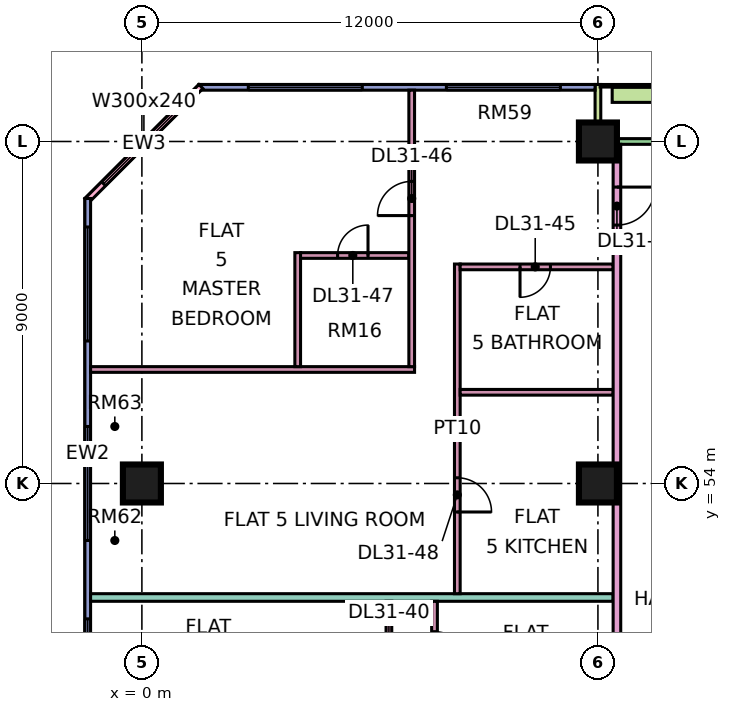
"""IFC4 building model, lengths in metres.
Left out: names, types, materials, properties, quantities, classifications, styles, units other than length and angle.
Written with IfcOpenShell. Run it as: python <this file> out.ifc"""

import sys

from ifc_helpers import new_model, si_unit, direction, frame, frame_2d, origin, origin_2d, place, context, subcontext, project, spatial, rectangle, extrude, element, fill, save


model = new_model("IFC4")
c1 = context("Model", 3, precision=1e-05, world=origin(), true_north=direction((0.0, 1.0)))
c2 = subcontext(c1, "Body", "Model", "MODEL_VIEW")
j1 = project(units=[si_unit("LENGTHUNIT", "METRE"), si_unit("PLANEANGLEUNIT", "RADIAN")], contexts=[c1])
p1 = place(None, origin())
s1 = spatial("IfcSite", under=j1, at=p1, CompositionType="ELEMENT")
p2 = place(p1, origin())
s2 = spatial("IfcBuilding", under=s1, at=p2, CompositionType="ELEMENT")
p3 = place(p2, frame((0.0, 0.0, 133.15)))
s3 = spatial("IfcBuildingStorey", under=s2, at=p3, CompositionType="ELEMENT", Elevation=133.15)
for number, where, z_axis, x_axis in (
    (1, (0.0, 54.0, 0.0), (0.0, 0.0, 1.0), (1.0, 0.0, 0.0)),
    (2, (12.0, 54.0, 0.0), (0.0, 0.0, 1.0), (1.0, 0.0, 0.0)),
    (3, (12.0, 63.0, 0.0), (0.0, 0.0, 1.0), (1.0, 0.0, 0.0)),
):
    element("IfcColumn", number, at=place(p3, frame(where, z_axis=z_axis, x_axis=x_axis)), inside=s3, PredefinedType="COLUMN", context=c2, shape_type="SweptSolid", body=[
        extrude(rectangle(XDim=1.0, YDim=1.0, at=origin_2d()), origin(), (0.0, 0.0, 1.0), 3.75),
    ])
p4 = place(p3, frame((22.425, 63.0, 0.0), z_axis=(0.0, 0.0, 1.0), x_axis=(-1.0, 0.0, 0.0)))
e4 = element("IfcWall", 4, at=p4, inside=s3, PredefinedType="SOLIDWALL", context=c2, shape_type="SweptSolid", body=[
    extrude(rectangle(XDim=10.35, YDim=0.15, at=frame_2d((5.175, 0.0))), origin(), (0.0, 0.0, 1.0), 3.35),
])
p5 = place(p4, frame((0.562, 0.0, 0.45)))
e5 = element("IfcOpeningElement", 5, at=p5, cuts=e4, PredefinedType="OPENING", context=c2, shape_type="SweptSolid", body=[
    extrude(rectangle(XDim=1.8, YDim=2.4, at=frame_2d((0.9, 1.2))), frame((0.0, 0.085, 0.0), z_axis=(0.0, -1.0, 0.0), x_axis=(1.0, 0.0, 0.0)), (0.0, 0.0, 1.0), 0.17),
])
p6 = place(p4, frame((4.575, 0.0, 0.45)))
e6 = element("IfcOpeningElement", 6, at=p6, cuts=e4, PredefinedType="OPENING", context=c2, shape_type="SweptSolid", body=[
    extrude(rectangle(XDim=1.8, YDim=2.4, at=frame_2d((0.9, 1.2))), frame((0.0, 0.085, 0.0), z_axis=(0.0, -1.0, 0.0), x_axis=(1.0, 0.0, 0.0)), (0.0, 0.0, 1.0), 0.17),
])
p7 = place(p3, frame((12.0, 64.5, 0.0), z_axis=(0.0, 0.0, 1.0), x_axis=(0.0, -1.0, 0.0)))
e7 = element("IfcWall", 7, at=p7, inside=s3, PredefinedType="SOLIDWALL", context=c2, shape_type="SweptSolid", body=[
    extrude(rectangle(XDim=1.5, YDim=0.15, at=frame_2d((0.75, 0.0))), origin(), (0.0, 0.0, 1.0), 3.35),
])
p8 = place(p3, frame((11.925, 64.425, 0.0), z_axis=(0.0, 0.0, 1.0), x_axis=(-1.0, 0.0, 0.0)))
e8 = element("IfcWall", 8, at=p8, inside=s3, PredefinedType="SOLIDWALL", context=c2, shape_type="SweptSolid", body=[
    extrude(rectangle(XDim=10.425, YDim=0.15, at=frame_2d((5.212, 0.0))), origin(), (0.0, 0.0, 1.0), 3.35),
])
p9 = place(p8, frame((0.913, 0.0, 0.45)))
e9 = element("IfcOpeningElement", 9, at=p9, cuts=e8, PredefinedType="OPENING", context=c2, shape_type="SweptSolid", body=[
    extrude(rectangle(XDim=3.0, YDim=2.4, at=frame_2d((1.5, 1.2))), frame((0.0, 0.085, 0.0), z_axis=(0.0, -1.0, 0.0), x_axis=(1.0, 0.0, 0.0)), (0.0, 0.0, 1.0), 0.17),
])
p10 = place(p8, frame((6.125, 0.0, 0.45)))
e10 = element("IfcOpeningElement", 10, at=p10, cuts=e8, PredefinedType="OPENING", context=c2, shape_type="SweptSolid", body=[
    extrude(rectangle(XDim=3.0, YDim=2.4, at=frame_2d((1.5, 1.2))), frame((0.0, 0.085, 0.0), z_axis=(0.0, -1.0, 0.0), x_axis=(1.0, 0.0, 0.0)), (0.0, 0.0, 1.0), 0.17),
])
p11 = place(p3, frame((1.553, 64.447, 0.0), z_axis=(0.0, 0.0, 1.0), x_axis=(-0.707106781187, -0.707106781187, 0.0)))
e11 = element("IfcWall", 11, at=p11, inside=s3, PredefinedType="SOLIDWALL", context=c2, shape_type="SweptSolid", body=[
    extrude(rectangle(XDim=4.243, YDim=0.15, at=frame_2d((2.121, 0.0))), origin(), (0.0, 0.0, 1.0), 3.35),
])
p12 = place(p11, frame((0.621, 0.0, 0.45)))
e12 = element("IfcOpeningElement", 12, at=p12, cuts=e11, PredefinedType="OPENING", context=c2, shape_type="SweptSolid", body=[
    extrude(rectangle(XDim=3.0, YDim=2.4, at=frame_2d((1.5, 1.2))), frame((0.0, 0.085, 0.0), z_axis=(0.0, -1.0, 0.0), x_axis=(1.0, 0.0, 0.0)), (0.0, 0.0, 1.0), 0.17),
])
p13 = place(p3, frame((-1.425, 61.5, 0.0), z_axis=(0.0, 0.0, 1.0), x_axis=(0.0, -1.0, 0.0)))
e13 = element("IfcWall", 13, at=p13, inside=s3, PredefinedType="SOLIDWALL", context=c2, shape_type="SweptSolid", body=[
    extrude(rectangle(XDim=13.425, YDim=0.15, at=frame_2d((6.712, 0.0))), origin(), (0.0, 0.0, 1.0), 3.35),
])
p14 = place(p13, frame((0.75, 0.0, 0.45)))
e14 = element("IfcOpeningElement", 14, at=p14, cuts=e13, PredefinedType="OPENING", context=c2, shape_type="SweptSolid", body=[
    extrude(rectangle(XDim=3.0, YDim=2.4, at=frame_2d((1.5, 1.2))), frame((0.0, 0.085, 0.0), z_axis=(0.0, -1.0, 0.0), x_axis=(1.0, 0.0, 0.0)), (0.0, 0.0, 1.0), 0.17),
])
p15 = place(p13, frame((6.0, 0.0, 0.45)))
e15 = element("IfcOpeningElement", 15, at=p15, cuts=e13, PredefinedType="OPENING", context=c2, shape_type="SweptSolid", body=[
    extrude(rectangle(XDim=3.0, YDim=2.4, at=frame_2d((1.5, 1.2))), frame((0.0, 0.085, 0.0), z_axis=(0.0, -1.0, 0.0), x_axis=(1.0, 0.0, 0.0)), (0.0, 0.0, 1.0), 0.17),
])
p16 = place(p13, frame((11.062, 0.0, 0.45)))
e16 = element("IfcOpeningElement", 16, at=p16, cuts=e13, PredefinedType="OPENING", context=c2, shape_type="SweptSolid", body=[
    extrude(rectangle(XDim=1.8, YDim=2.4, at=frame_2d((0.9, 1.2))), frame((0.0, 0.085, 0.0), z_axis=(0.0, -1.0, 0.0), x_axis=(1.0, 0.0, 0.0)), (0.0, 0.0, 1.0), 0.17),
])
p17 = place(p3, frame((22.125, 64.229, 0.0), z_axis=(0.0, 0.0, 1.0), x_axis=(-1.0, 0.0, 0.0)))
e17 = element("IfcWall", 17, at=p17, inside=s3, PredefinedType="SOLIDWALL", context=c2, shape_type="SweptSolid", body=[
    extrude(rectangle(XDim=9.75, YDim=0.4, at=frame_2d((4.875, 0.0))), origin(), (0.0, 0.0, 1.0), 0.7),
])
p18 = place(p3, frame((-1.35, 51.0, 0.0), z_axis=(0.0, 0.0, 1.0), x_axis=(1.0, 0.0, 0.0)))
e18 = element("IfcWall", 18, at=p18, inside=s3, PredefinedType="PARTITIONING", context=c2, shape_type="SweptSolid", body=[
    extrude(rectangle(XDim=13.75, YDim=0.2, at=frame_2d((6.875, 0.0))), origin(), (0.0, 0.0, 1.0), 3.35),
])
p19 = place(p3, frame((-1.35, 57.0, 0.0), z_axis=(0.0, 0.0, 1.0), x_axis=(1.0, 0.0, 0.0)))
e19 = element("IfcWall", 19, at=p19, inside=s3, PredefinedType="PARTITIONING", context=c2, shape_type="SweptSolid", body=[
    extrude(rectangle(XDim=8.525, YDim=0.15, at=frame_2d((4.263, 0.0))), origin(), (0.0, 0.0, 1.0), 3.35),
])
p20 = place(p3, frame((4.1, 57.075, 0.0), z_axis=(0.0, 0.0, 1.0), x_axis=(0.0, 1.0, 0.0)))
e20 = element("IfcWall", 20, at=p20, inside=s3, PredefinedType="PARTITIONING", context=c2, shape_type="SweptSolid", body=[
    extrude(rectangle(XDim=3.0, YDim=0.15, at=frame_2d((1.5, 0.0))), origin(), (0.0, 0.0, 1.0), 3.35),
])
p21 = place(p3, frame((4.175, 60.0, 0.0), z_axis=(0.0, 0.0, 1.0), x_axis=(1.0, 0.0, 0.0)))
e21 = element("IfcWall", 21, at=p21, inside=s3, PredefinedType="PARTITIONING", context=c2, shape_type="SweptSolid", body=[
    extrude(rectangle(XDim=2.85, YDim=0.15, at=frame_2d((1.425, 0.0))), origin(), (0.0, 0.0, 1.0), 3.35),
])
p22 = place(p21, frame((0.975, 0.0, 0.0)))
e22 = element("IfcOpeningElement", 22, at=p22, cuts=e21, PredefinedType="OPENING", context=c2, shape_type="SweptSolid", body=[
    extrude(rectangle(XDim=0.8, YDim=2.1, at=frame_2d((0.4, 1.05))), frame((0.0, 0.085, 0.0), z_axis=(0.0, -1.0, 0.0), x_axis=(1.0, 0.0, 0.0)), (0.0, 0.0, 1.0), 0.17),
])
p23 = place(p3, frame((6.5, 41.95, 0.0), z_axis=(0.0, 0.0, 1.0), x_axis=(0.0, 1.0, 0.0)))
e23 = element("IfcWall", 23, at=p23, inside=s3, PredefinedType="PARTITIONING", context=c2, shape_type="SweptSolid", body=[
    extrude(rectangle(XDim=8.95, YDim=0.15, at=frame_2d((4.475, 0.0))), origin(), (0.0, 0.0, 1.0), 3.35),
])
p24 = place(p23, frame((1.1, 0.0, 0.0)))
e24 = element("IfcOpeningElement", 24, at=p24, cuts=e23, PredefinedType="OPENING", context=c2, shape_type="SweptSolid", body=[
    extrude(rectangle(XDim=0.9, YDim=2.1, at=frame_2d((0.45, 1.05))), frame((0.0, 0.085, 0.0), z_axis=(0.0, -1.0, 0.0), x_axis=(1.0, 0.0, 0.0)), (0.0, 0.0, 1.0), 0.17),
])
p25 = place(p23, frame((7.1, 0.0, 0.0)))
e25 = element("IfcOpeningElement", 25, at=p25, cuts=e23, PredefinedType="OPENING", context=c2, shape_type="SweptSolid", body=[
    extrude(rectangle(XDim=0.9, YDim=2.1, at=frame_2d((0.45, 1.05))), frame((0.0, 0.085, 0.0), z_axis=(0.0, -1.0, 0.0), x_axis=(1.0, 0.0, 0.0)), (0.0, 0.0, 1.0), 0.17),
])
p26 = place(p3, frame((7.1, 57.075, 0.0), z_axis=(0.0, 0.0, 1.0), x_axis=(0.0, 1.0, 0.0)))
e26 = element("IfcWall", 26, at=p26, inside=s3, PredefinedType="PARTITIONING", context=c2, shape_type="SweptSolid", body=[
    extrude(rectangle(XDim=7.275, YDim=0.15, at=frame_2d((3.638, 0.0))), origin(), (0.0, 0.0, 1.0), 3.35),
])
p27 = place(p26, frame((3.975, 0.0, 0.0)))
e27 = element("IfcOpeningElement", 27, at=p27, cuts=e26, PredefinedType="OPENING", context=c2, shape_type="SweptSolid", body=[
    extrude(rectangle(XDim=0.9, YDim=2.1, at=frame_2d((0.45, 1.05))), frame((0.0, 0.085, 0.0), z_axis=(0.0, -1.0, 0.0), x_axis=(1.0, 0.0, 0.0)), (0.0, 0.0, 1.0), 0.17),
])
p28 = place(p3, frame((7.7, 39.525, 0.0), z_axis=(0.0, 0.0, 1.0), x_axis=(0.0, 1.0, 0.0)))
e28 = element("IfcWall", 28, at=p28, inside=s3, PredefinedType="PARTITIONING", context=c2, shape_type="SweptSolid", body=[
    extrude(rectangle(XDim=11.375, YDim=0.15, at=frame_2d((5.688, 0.0))), origin(), (0.0, 0.0, 1.0), 3.35),
])
p29 = place(p28, frame((0.825, 0.0, 0.0)))
e29 = element("IfcOpeningElement", 29, at=p29, cuts=e28, PredefinedType="OPENING", context=c2, shape_type="SweptSolid", body=[
    extrude(rectangle(XDim=0.8, YDim=2.1, at=frame_2d((0.4, 1.05))), frame((0.0, 0.085, 0.0), z_axis=(0.0, -1.0, 0.0), x_axis=(1.0, 0.0, 0.0)), (0.0, 0.0, 1.0), 0.17),
])
p30 = place(p28, frame((5.175, 0.0, 0.0)))
e30 = element("IfcOpeningElement", 30, at=p30, cuts=e28, PredefinedType="OPENING", context=c2, shape_type="SweptSolid", body=[
    extrude(rectangle(XDim=0.9, YDim=2.1, at=frame_2d((0.45, 1.05))), frame((0.0, 0.085, 0.0), z_axis=(0.0, -1.0, 0.0), x_axis=(1.0, 0.0, 0.0)), (0.0, 0.0, 1.0), 0.17),
])
p31 = place(p28, frame((9.675, 0.0, 0.0)))
e31 = element("IfcOpeningElement", 31, at=p31, cuts=e28, PredefinedType="OPENING", context=c2, shape_type="SweptSolid", body=[
    extrude(rectangle(XDim=0.9, YDim=2.1, at=frame_2d((0.45, 1.05))), frame((0.0, 0.085, 0.0), z_axis=(0.0, -1.0, 0.0), x_axis=(1.0, 0.0, 0.0)), (0.0, 0.0, 1.0), 0.17),
])
p32 = place(p3, frame((8.3, 51.1, 0.0), z_axis=(0.0, 0.0, 1.0), x_axis=(0.0, 1.0, 0.0)))
e32 = element("IfcWall", 32, at=p32, inside=s3, PredefinedType="PARTITIONING", context=c2, shape_type="SweptSolid", body=[
    extrude(rectangle(XDim=8.675, YDim=0.15, at=frame_2d((4.337, 0.0))), origin(), (0.0, 0.0, 1.0), 3.35),
])
p33 = place(p32, frame((2.15, 0.0, 0.0)))
e33 = element("IfcOpeningElement", 33, at=p33, cuts=e32, PredefinedType="OPENING", context=c2, shape_type="SweptSolid", body=[
    extrude(rectangle(XDim=0.9, YDim=2.1, at=frame_2d((0.45, 1.05))), frame((0.0, 0.085, 0.0), z_axis=(0.0, -1.0, 0.0), x_axis=(1.0, 0.0, 0.0)), (0.0, 0.0, 1.0), 0.17),
])
p34 = place(p3, frame((8.375, 56.4, 0.0), z_axis=(0.0, 0.0, 1.0), x_axis=(1.0, 0.0, 0.0)))
e34 = element("IfcWall", 34, at=p34, inside=s3, PredefinedType="PARTITIONING", context=c2, shape_type="SweptSolid", body=[
    extrude(rectangle(XDim=4.025, YDim=0.15, at=frame_2d((2.012, 0.0))), origin(), (0.0, 0.0, 1.0), 3.35),
])
p35 = place(p3, frame((8.375, 59.7, 0.0), z_axis=(0.0, 0.0, 1.0), x_axis=(1.0, 0.0, 0.0)))
e35 = element("IfcWall", 35, at=p35, inside=s3, PredefinedType="PARTITIONING", context=c2, shape_type="SweptSolid", body=[
    extrude(rectangle(XDim=4.025, YDim=0.15, at=frame_2d((2.012, 0.0))), origin(), (0.0, 0.0, 1.0), 3.35),
])
p36 = place(p35, frame((1.575, 0.0, 0.0)))
e36 = element("IfcOpeningElement", 36, at=p36, cuts=e35, PredefinedType="OPENING", context=c2, shape_type="SweptSolid", body=[
    extrude(rectangle(XDim=0.8, YDim=2.1, at=frame_2d((0.4, 1.05))), frame((0.0, 0.085, 0.0), z_axis=(0.0, -1.0, 0.0), x_axis=(1.0, 0.0, 0.0)), (0.0, 0.0, 1.0), 0.17),
])
p37 = place(p3, frame((12.5, 20.0, 0.0), z_axis=(0.0, 0.0, 1.0), x_axis=(0.0, 1.0, 0.0)))
e37 = element("IfcWall", 37, at=p37, inside=s3, PredefinedType="PARTITIONING", context=c2, shape_type="SweptSolid", body=[
    extrude(rectangle(XDim=42.926, YDim=0.2, at=frame_2d((21.463, 0.0))), origin(), (0.0, 0.0, 1.0), 3.35),
])
p38 = place(p37, frame((17.25, 0.0, 0.0)))
e38 = element("IfcOpeningElement", 38, at=p38, cuts=e37, PredefinedType="OPENING", context=c2, shape_type="SweptSolid", body=[
    extrude(rectangle(XDim=1.0, YDim=2.1, at=frame_2d((0.5, 1.05))), frame((0.0, 0.11, 0.0), z_axis=(0.0, -1.0, 0.0), x_axis=(1.0, 0.0, 0.0)), (0.0, 0.0, 1.0), 0.22),
])
p39 = place(p37, frame((40.8, 0.0, 0.0)))
e39 = element("IfcOpeningElement", 39, at=p39, cuts=e37, PredefinedType="OPENING", context=c2, shape_type="SweptSolid", body=[
    extrude(rectangle(XDim=1.0, YDim=2.1, at=frame_2d((0.5, 1.05))), frame((0.0, 0.11, 0.0), z_axis=(0.0, -1.0, 0.0), x_axis=(1.0, 0.0, 0.0)), (0.0, 0.0, 1.0), 0.22),
])
p40 = place(p37, frame((0.6, 0.0, 0.0)))
e40 = element("IfcOpeningElement", 40, at=p40, cuts=e37, PredefinedType="OPENING", context=c2, shape_type="SweptSolid", body=[
    extrude(rectangle(XDim=1.2, YDim=2.1, at=frame_2d((0.6, 1.05))), frame((0.0, 0.11, 0.0), z_axis=(0.0, -1.0, 0.0), x_axis=(1.0, 0.0, 0.0)), (0.0, 0.0, 1.0), 0.22),
])
p41 = place(p37, frame((13.65, 0.0, 0.0)))
e41 = element("IfcOpeningElement", 41, at=p41, cuts=e37, PredefinedType="OPENING", context=c2, shape_type="SweptSolid", body=[
    extrude(rectangle(XDim=1.0, YDim=2.1, at=frame_2d((0.5, 1.05))), frame((0.0, 0.11, 0.0), z_axis=(0.0, -1.0, 0.0), x_axis=(1.0, 0.0, 0.0)), (0.0, 0.0, 1.0), 0.22),
])
p42 = place(p9, origin())
e42 = element("IfcWindow", 42, at=p42, inside=s3, PartitioningType="SINGLE_PANEL", PredefinedType="WINDOW", context=c2, shape_type="SweptSolid", body=[
    extrude(rectangle(XDim=3.0, YDim=2.4, at=frame_2d((1.5, 1.2))), frame((0.0, 0.03, 0.0), z_axis=(0.0, -1.0, 0.0), x_axis=(1.0, 0.0, 0.0)), (0.0, 0.0, 1.0), 0.06),
])
fill(e9, e42)
p43 = place(p10, origin())
e43 = element("IfcWindow", 43, at=p43, inside=s3, PartitioningType="SINGLE_PANEL", PredefinedType="WINDOW", context=c2, shape_type="SweptSolid", body=[
    extrude(rectangle(XDim=3.0, YDim=2.4, at=frame_2d((1.5, 1.2))), frame((0.0, 0.03, 0.0), z_axis=(0.0, -1.0, 0.0), x_axis=(1.0, 0.0, 0.0)), (0.0, 0.0, 1.0), 0.06),
])
fill(e10, e43)
p44 = place(p12, origin())
e44 = element("IfcWindow", 44, at=p44, inside=s3, PartitioningType="SINGLE_PANEL", PredefinedType="WINDOW", context=c2, shape_type="SweptSolid", body=[
    extrude(rectangle(XDim=3.0, YDim=2.4, at=frame_2d((1.5, 1.2))), frame((0.0, 0.03, 0.0), z_axis=(0.0, -1.0, 0.0), x_axis=(1.0, 0.0, 0.0)), (0.0, 0.0, 1.0), 0.06),
])
fill(e12, e44)
p45 = place(p14, origin())
e45 = element("IfcWindow", 45, at=p45, inside=s3, PartitioningType="SINGLE_PANEL", PredefinedType="WINDOW", context=c2, shape_type="SweptSolid", body=[
    extrude(rectangle(XDim=3.0, YDim=2.4, at=frame_2d((1.5, 1.2))), frame((0.0, 0.03, 0.0), z_axis=(0.0, -1.0, 0.0), x_axis=(1.0, 0.0, 0.0)), (0.0, 0.0, 1.0), 0.06),
])
fill(e14, e45)
p46 = place(p15, origin())
e46 = element("IfcWindow", 46, at=p46, inside=s3, PartitioningType="SINGLE_PANEL", PredefinedType="WINDOW", context=c2, shape_type="SweptSolid", body=[
    extrude(rectangle(XDim=3.0, YDim=2.4, at=frame_2d((1.5, 1.2))), frame((0.0, 0.03, 0.0), z_axis=(0.0, -1.0, 0.0), x_axis=(1.0, 0.0, 0.0)), (0.0, 0.0, 1.0), 0.06),
])
fill(e15, e46)
p47 = place(p16, origin())
e47 = element("IfcWindow", 47, at=p47, inside=s3, PartitioningType="SINGLE_PANEL", PredefinedType="WINDOW", context=c2, shape_type="SweptSolid", body=[
    extrude(rectangle(XDim=1.8, YDim=2.4, at=frame_2d((0.9, 1.2))), frame((0.0, 0.03, 0.0), z_axis=(0.0, -1.0, 0.0), x_axis=(1.0, 0.0, 0.0)), (0.0, 0.0, 1.0), 0.06),
])
fill(e16, e47)
p48 = place(p31, frame((0.9, 0.0, 0.0), z_axis=(0.0, 0.0, 1.0), x_axis=(-1.0, 0.0, 0.0)))
e48 = element("IfcDoor", 48, at=p48, inside=s3, OperationType="SINGLE_SWING_LEFT", PredefinedType="DOOR", context=c2, shape_type="SweptSolid", body=[
    extrude(rectangle(XDim=0.9, YDim=2.1, at=frame_2d((0.45, 1.05))), frame((0.0, 0.025, 0.0), z_axis=(0.0, -1.0, 0.0), x_axis=(1.0, 0.0, 0.0)), (0.0, 0.0, 1.0), 0.05),
])
fill(e31, e48)
p49 = place(p36, frame((0.8, 0.0, 0.0), z_axis=(0.0, 0.0, 1.0), x_axis=(-1.0, 0.0, 0.0)))
e49 = element("IfcDoor", 49, at=p49, inside=s3, OperationType="SINGLE_SWING_LEFT", PredefinedType="DOOR", context=c2, shape_type="SweptSolid", body=[
    extrude(rectangle(XDim=0.8, YDim=2.1, at=frame_2d((0.4, 1.05))), frame((0.0, 0.025, 0.0), z_axis=(0.0, -1.0, 0.0), x_axis=(1.0, 0.0, 0.0)), (0.0, 0.0, 1.0), 0.05),
])
fill(e36, e49)
p50 = place(p27, origin())
e50 = element("IfcDoor", 50, at=p50, inside=s3, OperationType="SINGLE_SWING_LEFT", PredefinedType="DOOR", context=c2, shape_type="SweptSolid", body=[
    extrude(rectangle(XDim=0.9, YDim=2.1, at=frame_2d((0.45, 1.05))), frame((0.0, 0.025, 0.0), z_axis=(0.0, -1.0, 0.0), x_axis=(1.0, 0.0, 0.0)), (0.0, 0.0, 1.0), 0.05),
])
fill(e27, e50)
p51 = place(p22, frame((0.8, 0.0, 0.0), z_axis=(0.0, 0.0, 1.0), x_axis=(-1.0, 0.0, 0.0)))
e51 = element("IfcDoor", 51, at=p51, inside=s3, OperationType="SINGLE_SWING_RIGHT", PredefinedType="DOOR", context=c2, shape_type="SweptSolid", body=[
    extrude(rectangle(XDim=0.8, YDim=2.1, at=frame_2d((0.4, 1.05))), frame((0.0, 0.025, 0.0), z_axis=(0.0, -1.0, 0.0), x_axis=(1.0, 0.0, 0.0)), (0.0, 0.0, 1.0), 0.05),
])
fill(e22, e51)
p52 = place(p33, frame((0.9, 0.0, 0.0), z_axis=(0.0, 0.0, 1.0), x_axis=(-1.0, 0.0, 0.0)))
e52 = element("IfcDoor", 52, at=p52, inside=s3, OperationType="SINGLE_SWING_LEFT", PredefinedType="DOOR", context=c2, shape_type="SweptSolid", body=[
    extrude(rectangle(XDim=0.9, YDim=2.1, at=frame_2d((0.45, 1.05))), frame((0.0, 0.025, 0.0), z_axis=(0.0, -1.0, 0.0), x_axis=(1.0, 0.0, 0.0)), (0.0, 0.0, 1.0), 0.05),
])
fill(e33, e52)
p53 = place(p39, origin())
e53 = element("IfcDoor", 53, at=p53, inside=s3, OperationType="SINGLE_SWING_RIGHT", PredefinedType="DOOR", context=c2, shape_type="SweptSolid", body=[
    extrude(rectangle(XDim=1.0, YDim=2.1, at=frame_2d((0.5, 1.05))), frame((0.0, 0.025, 0.0), z_axis=(0.0, -1.0, 0.0), x_axis=(1.0, 0.0, 0.0)), (0.0, 0.0, 1.0), 0.05),
])
fill(e39, e53)
save(model, sys.argv[1])
